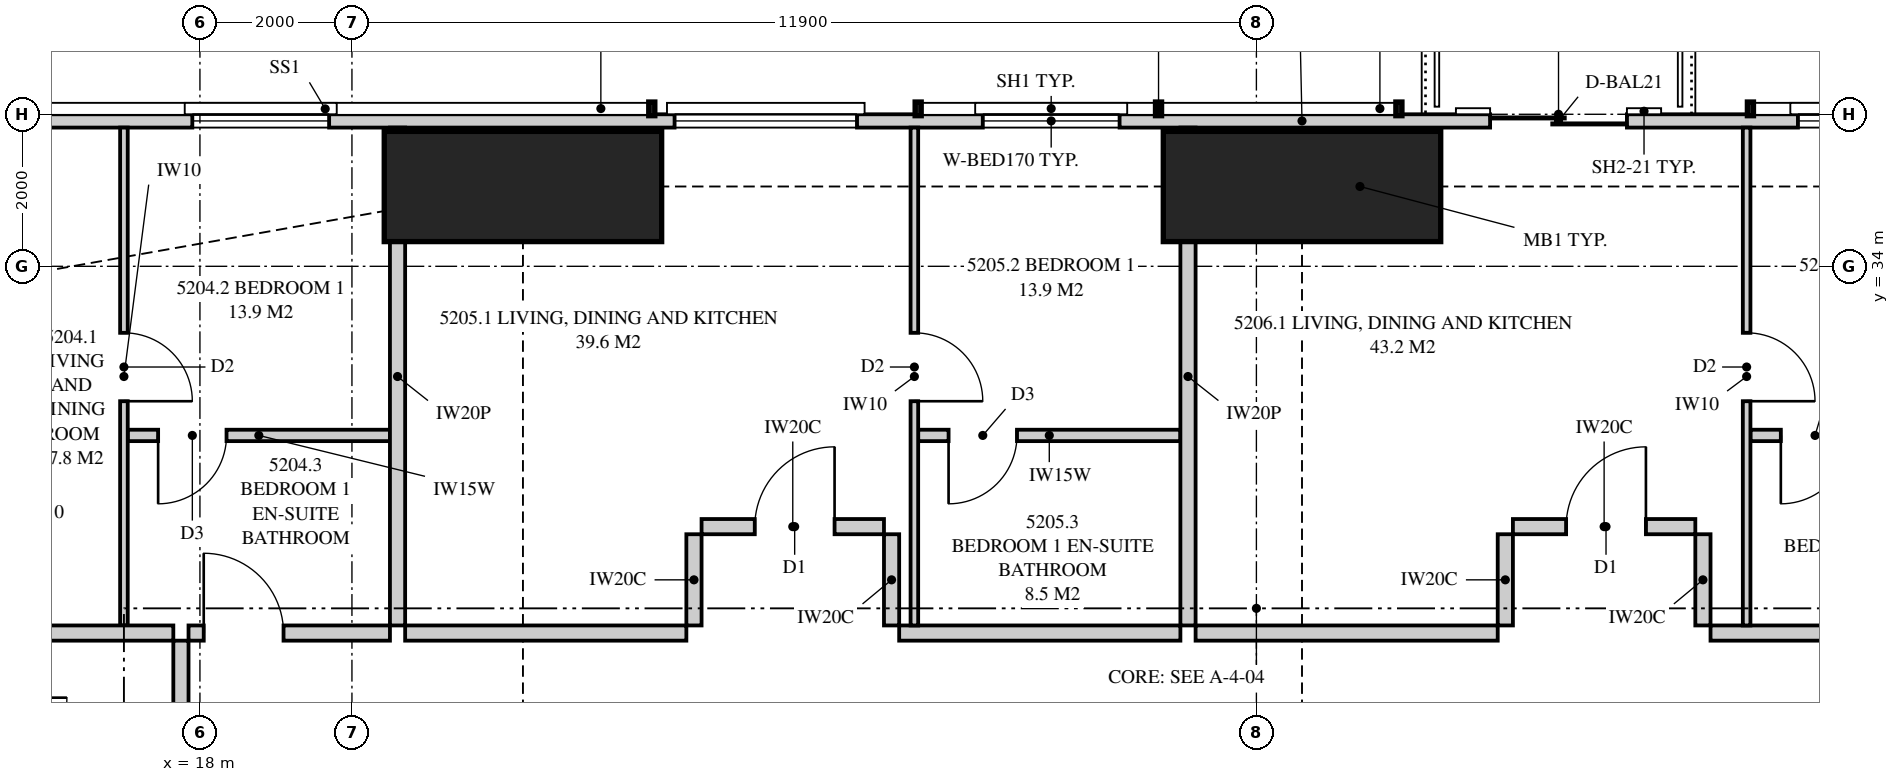
"""IFC4 building model, lengths in metres.
Left out: names, types, materials, properties, quantities, classifications, styles, units other than length and angle.
Written with IfcOpenShell. Run it as: python <this file> out.ifc"""

import sys

from ifc_helpers import new_model, si_unit, direction, frame, frame_2d, origin, origin_2d, place, context, subcontext, project, spatial, polyline, rectangle, outline, extrude, element, fill, save


model = new_model("IFC4")
c1 = context("Model", 3, precision=1e-05, world=origin(), true_north=direction((0.0, 1.0)))
c2 = subcontext(c1, "Body", "Model", "MODEL_VIEW")
j1 = project(units=[si_unit("LENGTHUNIT", "METRE"), si_unit("PLANEANGLEUNIT", "RADIAN")], contexts=[c1])
p1 = place(None, origin())
s1 = spatial("IfcSite", under=j1, at=p1, CompositionType="ELEMENT")
p2 = place(p1, origin())
s2 = spatial("IfcBuilding", under=s1, at=p2, CompositionType="ELEMENT")
p3 = place(p2, frame((0.0, 0.0, 191.2)))
s3 = spatial("IfcBuildingStorey", under=s2, at=p3, CompositionType="ELEMENT", Elevation=191.2)
for number, where, z_axis, x_axis in (
    (1, (32.5, 35.05, 0.0), (0.0, 0.0, 1.0), (0.0, 1.0, 0.0)),
    (2, (22.25, 35.05, 0.0), (0.0, 0.0, 1.0), (0.0, 1.0, 0.0)),
):
    element("IfcColumn", number, at=place(p3, frame(where, z_axis=z_axis, x_axis=x_axis)), inside=s3, PredefinedType="COLUMN", context=c2, shape_type="SweptSolid", body=[
        extrude(rectangle(XDim=1.45, YDim=3.65, at=origin_2d()), origin(), (0.0, 0.0, 1.0), 3.35),
    ])
p4 = place(p3, frame((49.949, 35.913, 0.0), z_axis=(0.0, 0.0, 1.0), x_axis=(-1.0, 0.0, 0.0)))
e3 = element("IfcWall", 3, at=p4, inside=s3, PredefinedType="SOLIDWALL", context=c2, shape_type="SweptSolid", body=[
    extrude(outline(polyline([(0.0, 0.0), (34.897, 0.0), (34.897, 3.11), (27.91, 3.11), (27.91, 2.15), (27.836, 2.15), (27.836, 3.11), (27.699, 3.11), (27.699, 2.15), (7.199, 2.15), (7.199, 3.11), (7.062, 3.11), (7.062, 2.15), (6.987, 2.15), (6.987, 3.11), (0.0, 3.11), (0.0, 0.0)])), frame((0.0, 0.087, 0.0), z_axis=(0.0, -1.0, 0.0), x_axis=(1.0, 0.0, 0.0)), (0.0, 0.0, 1.0), 0.175),
])
p5 = place(p4, frame((2.75, 0.0, 0.4)))
e4 = element("IfcOpeningElement", 4, at=p5, cuts=e3, PredefinedType="OPENING", context=c2, shape_type="SweptSolid", body=[
    extrude(rectangle(XDim=2.4, YDim=1.7, at=frame_2d((1.2, 0.85))), frame((0.0, 0.097, 0.0), z_axis=(0.0, -1.0, 0.0), x_axis=(1.0, 0.0, 0.0)), (0.0, 0.0, 1.0), 0.195),
])
p6 = place(p4, frame((9.124, 0.0, 0.4)))
e5 = element("IfcOpeningElement", 5, at=p6, cuts=e3, PredefinedType="OPENING", context=c2, shape_type="SweptSolid", body=[
    extrude(rectangle(XDim=1.8, YDim=1.7, at=frame_2d((0.9, 0.85))), frame((0.0, 0.097, 0.0), z_axis=(0.0, -1.0, 0.0), x_axis=(1.0, 0.0, 0.0)), (0.0, 0.0, 1.0), 0.195),
])
p7 = place(p4, frame((13.174, 0.0, 0.0)))
e6 = element("IfcOpeningElement", 6, at=p7, cuts=e3, PredefinedType="OPENING", context=c2, shape_type="SweptSolid", body=[
    extrude(rectangle(XDim=1.8, YDim=2.1, at=frame_2d((0.9, 1.05))), frame((0.0, 0.097, 0.0), z_axis=(0.0, -1.0, 0.0), x_axis=(1.0, 0.0, 0.0)), (0.0, 0.0, 1.0), 0.195),
])
p8 = place(p4, frame((19.849, 0.0, 0.4)))
e7 = element("IfcOpeningElement", 7, at=p8, cuts=e3, PredefinedType="OPENING", context=c2, shape_type="SweptSolid", body=[
    extrude(rectangle(XDim=1.8, YDim=1.7, at=frame_2d((0.9, 0.85))), frame((0.0, 0.097, 0.0), z_axis=(0.0, -1.0, 0.0), x_axis=(1.0, 0.0, 0.0)), (0.0, 0.0, 1.0), 0.195),
])
p9 = place(p4, frame((23.304, 0.0, 0.4)))
e8 = element("IfcOpeningElement", 8, at=p9, cuts=e3, PredefinedType="OPENING", context=c2, shape_type="SweptSolid", body=[
    extrude(rectangle(XDim=2.4, YDim=1.7, at=frame_2d((1.2, 0.85))), frame((0.0, 0.097, 0.0), z_axis=(0.0, -1.0, 0.0), x_axis=(1.0, 0.0, 0.0)), (0.0, 0.0, 1.0), 0.195),
])
p10 = place(p4, frame((30.249, 0.0, 0.4)))
e9 = element("IfcOpeningElement", 9, at=p10, cuts=e3, PredefinedType="OPENING", context=c2, shape_type="SweptSolid", body=[
    extrude(rectangle(XDim=1.8, YDim=1.7, at=frame_2d((0.9, 0.85))), frame((0.0, 0.097, 0.0), z_axis=(0.0, -1.0, 0.0), x_axis=(1.0, 0.0, 0.0)), (0.0, 0.0, 1.0), 0.195),
])
p11 = place(p3, frame((20.6, 35.825, 0.0), z_axis=(0.0, 0.0, 1.0), x_axis=(0.0, -1.0, 0.0)))
e10 = element("IfcWall", 10, at=p11, inside=s3, PredefinedType="PARTITIONING", context=c2, shape_type="SweptSolid", body=[
    extrude(outline(polyline([(0.0, 0.0), (6.55, 0.0), (6.55, 3.11), (1.991, 3.11), (1.991, 2.15), (0.143, 2.15), (0.143, 3.11), (0.0, 3.11), (0.0, 0.0)])), frame((0.0, 0.1, 0.0), z_axis=(0.0, -1.0, 0.0), x_axis=(1.0, 0.0, 0.0)), (0.0, 0.0, 1.0), 0.2),
])
p12 = place(p3, frame((17.85, 29.175, 0.0), z_axis=(0.0, 0.0, 1.0), x_axis=(1.0, 0.0, 0.0)))
e11 = element("IfcWall", 11, at=p12, inside=s3, PredefinedType="PARTITIONING", context=c2, shape_type="SweptSolid", body=[
    extrude(rectangle(XDim=2.65, YDim=0.2, at=frame_2d((1.325, 0.0))), origin(), (0.0, 0.0, 1.0), 3.11),
])
p13 = place(p12, frame((0.2, 0.0, 0.0)))
e12 = element("IfcOpeningElement", 12, at=p13, cuts=e11, PredefinedType="OPENING", context=c2, shape_type="SweptSolid", body=[
    extrude(rectangle(XDim=1.05, YDim=2.2, at=frame_2d((0.525, 1.1))), frame((0.0, 0.11, 0.0), z_axis=(0.0, -1.0, 0.0), x_axis=(1.0, 0.0, 0.0)), (0.0, 0.0, 1.0), 0.22),
])
p14 = place(p3, frame((17.0, 35.825, 0.0), z_axis=(0.0, 0.0, 1.0), x_axis=(0.0, -1.0, 0.0)))
e13 = element("IfcWall", 13, at=p14, inside=s3, PredefinedType="PARTITIONING", context=c2, shape_type="SweptSolid", body=[
    extrude(outline(polyline([(0.0, 0.0), (6.55, 0.0), (6.55, 3.11), (2.578, 3.11), (2.578, 2.15), (0.831, 2.15), (0.831, 3.11), (0.0, 3.11), (0.0, 0.0)])), frame((0.0, 0.05, 0.0), z_axis=(0.0, -1.0, 0.0), x_axis=(1.0, 0.0, 0.0)), (0.0, 0.0, 1.0), 0.1),
])
p15 = place(p14, frame((2.7, 0.0, 0.0)))
e14 = element("IfcOpeningElement", 14, at=p15, cuts=e13, PredefinedType="OPENING", context=c2, shape_type="SweptSolid", body=[
    extrude(rectangle(XDim=0.9, YDim=2.1, at=frame_2d((0.45, 1.05))), frame((0.0, 0.06, 0.0), z_axis=(0.0, -1.0, 0.0), x_axis=(1.0, 0.0, 0.0)), (0.0, 0.0, 1.0), 0.12),
])
p16 = place(p3, frame((17.05, 31.775, 0.0), z_axis=(0.0, 0.0, 1.0), x_axis=(1.0, 0.0, 0.0)))
e15 = element("IfcWall", 15, at=p16, inside=s3, PredefinedType="PLUMBINGWALL", context=c2, shape_type="SweptSolid", body=[
    extrude(rectangle(XDim=3.45, YDim=0.15, at=frame_2d((1.725, 0.0))), origin(), (0.0, 0.0, 1.0), 3.11),
])
p17 = place(p16, frame((0.4, 0.0, 0.0)))
e16 = element("IfcOpeningElement", 16, at=p17, cuts=e15, PredefinedType="OPENING", context=c2, shape_type="SweptSolid", body=[
    extrude(rectangle(XDim=0.9, YDim=2.1, at=frame_2d((0.45, 1.05))), frame((0.0, 0.085, 0.0), z_axis=(0.0, -1.0, 0.0), x_axis=(1.0, 0.0, 0.0)), (0.0, 0.0, 1.0), 0.17),
])
p18 = place(p3, frame((31.0, 35.825, 0.0), z_axis=(0.0, 0.0, 1.0), x_axis=(0.0, -1.0, 0.0)))
e17 = element("IfcWall", 17, at=p18, inside=s3, PredefinedType="PARTITIONING", context=c2, shape_type="SweptSolid", body=[
    extrude(outline(polyline([(0.0, 0.0), (6.55, 0.0), (6.55, 3.11), (1.685, 3.11), (1.685, 2.15), (0.0, 2.15), (0.0, 3.11), (0.0, 0.0)])), frame((0.0, 0.1, 0.0), z_axis=(0.0, -1.0, 0.0), x_axis=(1.0, 0.0, 0.0)), (0.0, 0.0, 1.0), 0.2),
])
p19 = place(p3, frame((20.7, 29.175, 0.0), z_axis=(0.0, 0.0, 1.0), x_axis=(1.0, 0.0, 0.0)))
e18 = element("IfcWall", 18, at=p19, inside=s3, PredefinedType="PARTITIONING", context=c2, shape_type="SweptSolid", body=[
    extrude(outline(polyline([(0.0, 0.0), (3.7, 0.0), (3.7, 3.11), (1.887, 3.11), (1.887, 2.541), (1.213, 2.541), (1.213, 3.11), (0.0, 3.11), (0.0, 0.0)])), frame((0.0, 0.1, 0.0), z_axis=(0.0, -1.0, 0.0), x_axis=(1.0, 0.0, 0.0)), (0.0, 0.0, 1.0), 0.2),
])
p20 = place(p3, frame((27.4, 35.825, 0.0), z_axis=(0.0, 0.0, 1.0), x_axis=(0.0, -1.0, 0.0)))
e19 = element("IfcWall", 19, at=p20, inside=s3, PredefinedType="PARTITIONING", context=c2, shape_type="SweptSolid", body=[
    extrude(outline(polyline([(0.0, 0.0), (6.55, 0.0), (6.55, 3.11), (1.635, 3.11), (1.635, 2.15), (0.0, 2.15), (0.0, 3.11), (0.0, 0.0)])), frame((0.0, 0.05, 0.0), z_axis=(0.0, -1.0, 0.0), x_axis=(1.0, 0.0, 0.0)), (0.0, 0.0, 1.0), 0.1),
])
p21 = place(p20, frame((2.7, 0.0, 0.0)))
e20 = element("IfcOpeningElement", 20, at=p21, cuts=e19, PredefinedType="OPENING", context=c2, shape_type="SweptSolid", body=[
    extrude(rectangle(XDim=0.9, YDim=2.1, at=frame_2d((0.45, 1.05))), frame((0.0, 0.06, 0.0), z_axis=(0.0, -1.0, 0.0), x_axis=(1.0, 0.0, 0.0)), (0.0, 0.0, 1.0), 0.12),
])
p22 = place(p3, frame((27.45, 31.775, 0.0), z_axis=(0.0, 0.0, 1.0), x_axis=(1.0, 0.0, 0.0)))
e21 = element("IfcWall", 21, at=p22, inside=s3, PredefinedType="PLUMBINGWALL", context=c2, shape_type="SweptSolid", body=[
    extrude(rectangle(XDim=3.45, YDim=0.15, at=frame_2d((1.725, 0.0))), origin(), (0.0, 0.0, 1.0), 3.11),
])
p23 = place(p22, frame((0.4, 0.0, 0.0)))
e22 = element("IfcOpeningElement", 22, at=p23, cuts=e21, PredefinedType="OPENING", context=c2, shape_type="SweptSolid", body=[
    extrude(rectangle(XDim=0.9, YDim=2.1, at=frame_2d((0.45, 1.05))), frame((0.0, 0.085, 0.0), z_axis=(0.0, -1.0, 0.0), x_axis=(1.0, 0.0, 0.0)), (0.0, 0.0, 1.0), 0.17),
])
p24 = place(p3, frame((31.1, 29.175, 0.0), z_axis=(0.0, 0.0, 1.0), x_axis=(1.0, 0.0, 0.0)))
e23 = element("IfcWall", 23, at=p24, inside=s3, PredefinedType="PARTITIONING", context=c2, shape_type="SweptSolid", body=[
    extrude(outline(polyline([(0.0, 0.0), (3.975, 0.0), (3.975, 3.11), (1.737, 3.11), (1.737, 2.541), (1.062, 2.541), (1.062, 3.11), (0.0, 3.11), (0.0, 0.0)])), frame((0.0, 0.1, 0.0), z_axis=(0.0, -1.0, 0.0), x_axis=(1.0, 0.0, 0.0)), (0.0, 0.0, 1.0), 0.2),
])
p25 = place(p3, frame((38.35, 35.825, 0.0), z_axis=(0.0, 0.0, 1.0), x_axis=(0.0, -1.0, 0.0)))
e24 = element("IfcWall", 24, at=p25, inside=s3, PredefinedType="PARTITIONING", context=c2, shape_type="SweptSolid", body=[
    extrude(outline(polyline([(0.0, 0.0), (6.55, 0.0), (6.55, 3.11), (1.635, 3.11), (1.635, 2.15), (0.0, 2.15), (0.0, 3.11), (0.0, 0.0)])), frame((0.0, 0.05, 0.0), z_axis=(0.0, -1.0, 0.0), x_axis=(1.0, 0.0, 0.0)), (0.0, 0.0, 1.0), 0.1),
])
p26 = place(p25, frame((2.7, 0.0, 0.0)))
e25 = element("IfcOpeningElement", 25, at=p26, cuts=e24, PredefinedType="OPENING", context=c2, shape_type="SweptSolid", body=[
    extrude(rectangle(XDim=0.9, YDim=2.1, at=frame_2d((0.45, 1.05))), frame((0.0, 0.06, 0.0), z_axis=(0.0, -1.0, 0.0), x_axis=(1.0, 0.0, 0.0)), (0.0, 0.0, 1.0), 0.12),
])
p27 = place(p3, frame((38.4, 31.775, 0.0), z_axis=(0.0, 0.0, 1.0), x_axis=(1.0, 0.0, 0.0)))
e26 = element("IfcWall", 26, at=p27, inside=s3, PredefinedType="PLUMBINGWALL", context=c2, shape_type="SweptSolid", body=[
    extrude(rectangle(XDim=3.45, YDim=0.15, at=frame_2d((1.725, 0.0))), origin(), (0.0, 0.0, 1.0), 3.11),
])
p28 = place(p27, frame((0.4, 0.0, 0.0)))
e27 = element("IfcOpeningElement", 27, at=p28, cuts=e26, PredefinedType="OPENING", context=c2, shape_type="SweptSolid", body=[
    extrude(rectangle(XDim=0.9, YDim=2.1, at=frame_2d((0.45, 1.05))), frame((0.0, 0.085, 0.0), z_axis=(0.0, -1.0, 0.0), x_axis=(1.0, 0.0, 0.0)), (0.0, 0.0, 1.0), 0.17),
])
p29 = place(p3, frame((12.0, 29.175, 0.0), z_axis=(0.0, 0.0, 1.0), x_axis=(1.0, 0.0, 0.0)))
e28 = element("IfcWall", 28, at=p29, inside=s3, PredefinedType="PARTITIONING", context=c2, shape_type="SweptSolid", body=[
    extrude(outline(polyline([(0.0, 0.0), (5.65, 0.0), (5.65, 3.11), (2.547, 3.11), (2.547, 2.15), (0.703, 2.15), (0.703, 3.11), (0.0, 3.11), (0.0, 0.0)])), frame((0.0, 0.1, 0.0), z_axis=(0.0, -1.0, 0.0), x_axis=(1.0, 0.0, 0.0)), (0.0, 0.0, 1.0), 0.2),
])
p30 = place(p3, frame((17.75, 7.925, 0.0), z_axis=(0.0, 0.0, 1.0), x_axis=(0.0, 1.0, 0.0)))
e29 = element("IfcWall", 29, at=p30, inside=s3, PredefinedType="PARTITIONING", context=c2, shape_type="SweptSolid", body=[
    extrude(outline(polyline([(0.0, 0.0), (21.15, 0.0), (21.15, 3.11), (17.412, 3.11), (17.412, 2.541), (16.738, 2.541), (16.738, 3.11), (5.412, 3.11), (5.412, 2.541), (4.738, 2.541), (4.738, 3.11), (0.0, 3.11), (0.0, 0.0)])), frame((0.0, 0.1, 0.0), z_axis=(0.0, -1.0, 0.0), x_axis=(1.0, 0.0, 0.0)), (0.0, 0.0, 1.0), 0.2),
])
p31 = place(p30, frame((16.25, 0.0, 0.0)))
e30 = element("IfcOpeningElement", 30, at=p31, cuts=e29, PredefinedType="OPENING", context=c2, shape_type="SweptSolid", body=[
    extrude(rectangle(XDim=1.05, YDim=2.2, at=frame_2d((0.525, 1.1))), frame((0.0, 0.11, 0.0), z_axis=(0.0, -1.0, 0.0), x_axis=(1.0, 0.0, 0.0)), (0.0, 0.0, 1.0), 0.22),
])
p32 = place(p3, frame((27.2, 29.175, 0.0), z_axis=(0.0, 0.0, 1.0), x_axis=(1.0, 0.0, 0.0)))
e31 = element("IfcWall", 31, at=p32, inside=s3, PredefinedType="PARTITIONING", context=c2, shape_type="SweptSolid", body=[
    extrude(rectangle(XDim=3.7, YDim=0.2, at=frame_2d((1.85, 0.0))), origin(), (0.0, 0.0, 1.0), 3.11),
])
p33 = place(p3, frame((24.6, 30.575, 0.0), z_axis=(0.0, 0.0, 1.0), x_axis=(1.0, 0.0, 0.0)))
e32 = element("IfcWall", 32, at=p33, inside=s3, PredefinedType="PARTITIONING", context=c2, shape_type="SweptSolid", body=[
    extrude(rectangle(XDim=2.4, YDim=0.2, at=frame_2d((1.2, 0.0))), origin(), (0.0, 0.0, 1.0), 3.11),
])
p34 = place(p33, frame((0.7, 0.0, 0.0)))
e33 = element("IfcOpeningElement", 33, at=p34, cuts=e32, PredefinedType="OPENING", context=c2, shape_type="SweptSolid", body=[
    extrude(rectangle(XDim=1.05, YDim=2.2, at=frame_2d((0.525, 1.1))), frame((0.0, 0.11, 0.0), z_axis=(0.0, -1.0, 0.0), x_axis=(1.0, 0.0, 0.0)), (0.0, 0.0, 1.0), 0.22),
])
for number, where, z_axis, x_axis in (
    (34, (24.5, 29.275, 0.0), (0.0, 0.0, 1.0), (0.0, 1.0, 0.0)),
    (35, (27.1, 29.275, 0.0), (0.0, 0.0, 1.0), (0.0, 1.0, 0.0)),
):
    element("IfcWall", number, at=place(p3, frame(where, z_axis=z_axis, x_axis=x_axis)), inside=s3, PredefinedType="PARTITIONING", context=c2, shape_type="SweptSolid", body=[
        extrude(rectangle(XDim=1.2, YDim=0.2, at=frame_2d((0.6, 0.0))), origin(), (0.0, 0.0, 1.0), 3.11),
    ])
p35 = place(p3, frame((37.875, 29.175, 0.0), z_axis=(0.0, 0.0, 1.0), x_axis=(1.0, 0.0, 0.0)))
e36 = element("IfcWall", 36, at=p35, inside=s3, PredefinedType="PARTITIONING", context=c2, shape_type="SweptSolid", body=[
    extrude(rectangle(XDim=3.975, YDim=0.2, at=frame_2d((1.988, 0.0))), origin(), (0.0, 0.0, 1.0), 3.11),
])
p36 = place(p3, frame((35.275, 30.575, 0.0), z_axis=(0.0, 0.0, 1.0), x_axis=(1.0, 0.0, 0.0)))
e37 = element("IfcWall", 37, at=p36, inside=s3, PredefinedType="PARTITIONING", context=c2, shape_type="SweptSolid", body=[
    extrude(rectangle(XDim=2.4, YDim=0.2, at=frame_2d((1.2, 0.0))), origin(), (0.0, 0.0, 1.0), 3.11),
])
p37 = place(p36, frame((0.7, 0.0, 0.0)))
e38 = element("IfcOpeningElement", 38, at=p37, cuts=e37, PredefinedType="OPENING", context=c2, shape_type="SweptSolid", body=[
    extrude(rectangle(XDim=1.05, YDim=2.2, at=frame_2d((0.525, 1.1))), frame((0.0, 0.11, 0.0), z_axis=(0.0, -1.0, 0.0), x_axis=(1.0, 0.0, 0.0)), (0.0, 0.0, 1.0), 0.22),
])
for number, where, z_axis, x_axis in (
    (39, (35.175, 29.275, 0.0), (0.0, 0.0, 1.0), (0.0, 1.0, 0.0)),
    (40, (37.775, 29.275, 0.0), (0.0, 0.0, 1.0), (0.0, 1.0, 0.0)),
):
    element("IfcWall", number, at=place(p3, frame(where, z_axis=z_axis, x_axis=x_axis)), inside=s3, PredefinedType="PARTITIONING", context=c2, shape_type="SweptSolid", body=[
        extrude(rectangle(XDim=1.2, YDim=0.2, at=frame_2d((0.6, 0.0))), origin(), (0.0, 0.0, 1.0), 3.11),
    ])
p38 = place(p6, origin())
e41 = element("IfcWindow", 41, at=p38, inside=s3, PartitioningType="SINGLE_PANEL", PredefinedType="WINDOW", context=c2, shape_type="SweptSolid", body=[
    extrude(rectangle(XDim=1.8, YDim=1.7, at=frame_2d((0.9, 0.85))), frame((0.0, 0.03, 0.0), z_axis=(0.0, -1.0, 0.0), x_axis=(1.0, 0.0, 0.0)), (0.0, 0.0, 1.0), 0.06),
])
fill(e5, e41)
p39 = place(p7, origin())
e42 = element("IfcDoor", 42, at=p39, inside=s3, OperationType="SLIDING_TO_LEFT", PredefinedType="DOOR", context=c2, shape_type="SweptSolid", body=[
    extrude(rectangle(XDim=1.8, YDim=2.1, at=frame_2d((0.9, 1.05))), frame((0.0, 0.025, 0.0), z_axis=(0.0, -1.0, 0.0), x_axis=(1.0, 0.0, 0.0)), (0.0, 0.0, 1.0), 0.05),
])
fill(e6, e42)
p40 = place(p8, origin())
e43 = element("IfcWindow", 43, at=p40, inside=s3, PartitioningType="SINGLE_PANEL", PredefinedType="WINDOW", context=c2, shape_type="SweptSolid", body=[
    extrude(rectangle(XDim=1.8, YDim=1.7, at=frame_2d((0.9, 0.85))), frame((0.0, 0.03, 0.0), z_axis=(0.0, -1.0, 0.0), x_axis=(1.0, 0.0, 0.0)), (0.0, 0.0, 1.0), 0.06),
])
fill(e7, e43)
p41 = place(p9, origin())
e44 = element("IfcWindow", 44, at=p41, inside=s3, PartitioningType="SINGLE_PANEL", PredefinedType="WINDOW", context=c2, shape_type="SweptSolid", body=[
    extrude(rectangle(XDim=2.4, YDim=1.7, at=frame_2d((1.2, 0.85))), frame((0.0, 0.03, 0.0), z_axis=(0.0, -1.0, 0.0), x_axis=(1.0, 0.0, 0.0)), (0.0, 0.0, 1.0), 0.06),
])
fill(e8, e44)
p42 = place(p10, origin())
e45 = element("IfcWindow", 45, at=p42, inside=s3, PartitioningType="SINGLE_PANEL", PredefinedType="WINDOW", context=c2, shape_type="SweptSolid", body=[
    extrude(rectangle(XDim=1.8, YDim=1.7, at=frame_2d((0.9, 0.85))), frame((0.0, 0.03, 0.0), z_axis=(0.0, -1.0, 0.0), x_axis=(1.0, 0.0, 0.0)), (0.0, 0.0, 1.0), 0.06),
])
fill(e9, e45)
p43 = place(p13, origin())
e46 = element("IfcDoor", 46, at=p43, inside=s3, OperationType="SINGLE_SWING_LEFT", PredefinedType="DOOR", context=c2, shape_type="SweptSolid", body=[
    extrude(rectangle(XDim=1.05, YDim=2.2, at=frame_2d((0.525, 1.1))), frame((0.0, 0.025, 0.0), z_axis=(0.0, -1.0, 0.0), x_axis=(1.0, 0.0, 0.0)), (0.0, 0.0, 1.0), 0.05),
])
fill(e12, e46)
p44 = place(p15, origin())
e47 = element("IfcDoor", 47, at=p44, inside=s3, OperationType="SINGLE_SWING_RIGHT", PredefinedType="DOOR", context=c2, shape_type="SweptSolid", body=[
    extrude(rectangle(XDim=0.9, YDim=2.1, at=frame_2d((0.45, 1.05))), frame((0.0, 0.025, 0.0), z_axis=(0.0, -1.0, 0.0), x_axis=(1.0, 0.0, 0.0)), (0.0, 0.0, 1.0), 0.05),
])
fill(e14, e47)
p45 = place(p17, frame((0.9, 0.0, 0.0), z_axis=(0.0, 0.0, 1.0), x_axis=(-1.0, 0.0, 0.0)))
e48 = element("IfcDoor", 48, at=p45, inside=s3, OperationType="SINGLE_SWING_RIGHT", PredefinedType="DOOR", context=c2, shape_type="SweptSolid", body=[
    extrude(rectangle(XDim=0.9, YDim=2.1, at=frame_2d((0.45, 1.05))), frame((0.0, 0.025, 0.0), z_axis=(0.0, -1.0, 0.0), x_axis=(1.0, 0.0, 0.0)), (0.0, 0.0, 1.0), 0.05),
])
fill(e16, e48)
p46 = place(p34, origin())
e49 = element("IfcDoor", 49, at=p46, inside=s3, OperationType="SINGLE_SWING_RIGHT", PredefinedType="DOOR", context=c2, shape_type="SweptSolid", body=[
    extrude(rectangle(XDim=1.05, YDim=2.2, at=frame_2d((0.525, 1.1))), frame((0.0, 0.025, 0.0), z_axis=(0.0, -1.0, 0.0), x_axis=(1.0, 0.0, 0.0)), (0.0, 0.0, 1.0), 0.05),
])
fill(e33, e49)
p47 = place(p21, origin())
e50 = element("IfcDoor", 50, at=p47, inside=s3, OperationType="SINGLE_SWING_RIGHT", PredefinedType="DOOR", context=c2, shape_type="SweptSolid", body=[
    extrude(rectangle(XDim=0.9, YDim=2.1, at=frame_2d((0.45, 1.05))), frame((0.0, 0.025, 0.0), z_axis=(0.0, -1.0, 0.0), x_axis=(1.0, 0.0, 0.0)), (0.0, 0.0, 1.0), 0.05),
])
fill(e20, e50)
p48 = place(p23, frame((0.9, 0.0, 0.0), z_axis=(0.0, 0.0, 1.0), x_axis=(-1.0, 0.0, 0.0)))
e51 = element("IfcDoor", 51, at=p48, inside=s3, OperationType="SINGLE_SWING_RIGHT", PredefinedType="DOOR", context=c2, shape_type="SweptSolid", body=[
    extrude(rectangle(XDim=0.9, YDim=2.1, at=frame_2d((0.45, 1.05))), frame((0.0, 0.025, 0.0), z_axis=(0.0, -1.0, 0.0), x_axis=(1.0, 0.0, 0.0)), (0.0, 0.0, 1.0), 0.05),
])
fill(e22, e51)
p49 = place(p37, origin())
e52 = element("IfcDoor", 52, at=p49, inside=s3, OperationType="SINGLE_SWING_RIGHT", PredefinedType="DOOR", context=c2, shape_type="SweptSolid", body=[
    extrude(rectangle(XDim=1.05, YDim=2.2, at=frame_2d((0.525, 1.1))), frame((0.0, 0.025, 0.0), z_axis=(0.0, -1.0, 0.0), x_axis=(1.0, 0.0, 0.0)), (0.0, 0.0, 1.0), 0.05),
])
fill(e38, e52)
p50 = place(p26, origin())
e53 = element("IfcDoor", 53, at=p50, inside=s3, OperationType="SINGLE_SWING_RIGHT", PredefinedType="DOOR", context=c2, shape_type="SweptSolid", body=[
    extrude(rectangle(XDim=0.9, YDim=2.1, at=frame_2d((0.45, 1.05))), frame((0.0, 0.025, 0.0), z_axis=(0.0, -1.0, 0.0), x_axis=(1.0, 0.0, 0.0)), (0.0, 0.0, 1.0), 0.05),
])
fill(e25, e53)
p51 = place(p28, frame((0.9, 0.0, 0.0), z_axis=(0.0, 0.0, 1.0), x_axis=(-1.0, 0.0, 0.0)))
e54 = element("IfcDoor", 54, at=p51, inside=s3, OperationType="SINGLE_SWING_RIGHT", PredefinedType="DOOR", context=c2, shape_type="SweptSolid", body=[
    extrude(rectangle(XDim=0.9, YDim=2.1, at=frame_2d((0.45, 1.05))), frame((0.0, 0.025, 0.0), z_axis=(0.0, -1.0, 0.0), x_axis=(1.0, 0.0, 0.0)), (0.0, 0.0, 1.0), 0.05),
])
fill(e27, e54)
save(model, sys.argv[1])
